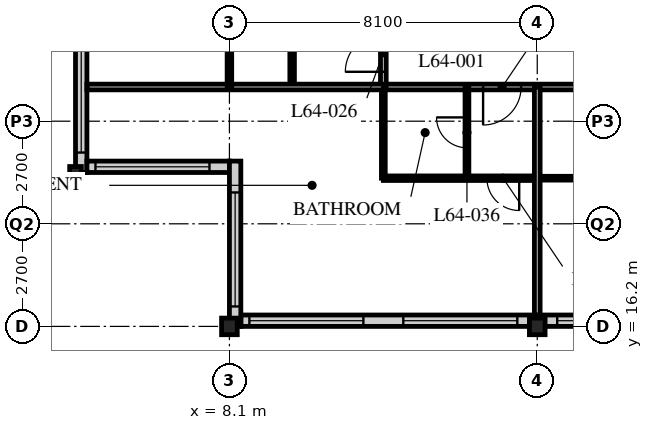
"""IFC4 building model, lengths in metres.
Left out: names, types, materials, properties, quantities, classifications, styles, units other than length and angle.
Written with IfcOpenShell. Run it as: python <this file> out.ifc"""

import sys

from ifc_helpers import new_model, si_unit, direction, frame, frame_2d, origin, origin_2d, place, context, subcontext, project, spatial, rectangle, i_section, extrude, element, fill, save


model = new_model("IFC4")
c1 = context("Model", 3, precision=1e-05, world=origin(), true_north=direction((0.0, 1.0)))
c2 = subcontext(c1, "Body", "Model", "MODEL_VIEW")
j1 = project(units=[si_unit("LENGTHUNIT", "METRE"), si_unit("PLANEANGLEUNIT", "RADIAN")], contexts=[c1])
p1 = place(None, origin())
s1 = spatial("IfcSite", under=j1, at=p1, CompositionType="ELEMENT")
p2 = place(p1, origin())
s2 = spatial("IfcBuilding", under=s1, at=p2, CompositionType="ELEMENT")
p3 = place(p2, frame((0.0, 0.0, 250.2)))
s3 = spatial("IfcBuildingStorey", under=s2, at=p3, CompositionType="ELEMENT", Elevation=250.2)
p4 = place(p3, frame((4.05, 20.25, 0.0), z_axis=(0.0, 0.0, 1.0), x_axis=(1.0, 0.0, 0.0)))
e1 = element("IfcColumn", 1, at=p4, inside=s3, PredefinedType="COLUMN", context=c2, shape_type="SweptSolid", body=[
    extrude(i_section(OverallWidth=0.307, OverallDepth=0.314, WebThickness=0.012, FlangeThickness=0.019, FilletRadius=0.015, at=origin_2d()), origin(), (0.0, 0.0, 1.0), 3.9),
])
for number, where, z_axis, x_axis in (
    (2, (8.1, 16.2, 0.0), (0.0, 0.0, 1.0), (1.0, 0.0, 0.0)),
    (3, (16.2, 16.2, 0.0), (0.0, 0.0, 1.0), (1.0, 0.0, 0.0)),
):
    element("IfcColumn", number, at=place(p3, frame(where, z_axis=z_axis, x_axis=x_axis)), inside=s3, PredefinedType="COLUMN", context=c2, shape_type="SweptSolid", body=[
        extrude(i_section(OverallWidth=0.412, OverallDepth=0.437, WebThickness=0.036, FlangeThickness=0.058, FilletRadius=0.015, at=origin_2d()), origin(), (0.0, 0.0, 1.0), 3.9),
    ])
p5 = place(p3, frame((8.4, 16.35, 0.0), z_axis=(0.0, 0.0, 1.0), x_axis=(1.0, 0.0, 0.0)))
e4 = element("IfcWall", 4, at=p5, inside=s3, PredefinedType="SOLIDWALL", context=c2, shape_type="SweptSolid", body=[
    extrude(rectangle(XDim=40.2, YDim=0.3, at=frame_2d((20.1, 0.0))), origin(), (0.0, 0.0, 1.0), 3.69),
])
p6 = place(p5, frame((0.225, 0.0, 0.6)))
e5 = element("IfcOpeningElement", 5, at=p6, cuts=e4, PredefinedType="OPENING", context=c2, shape_type="SweptSolid", body=[
    extrude(rectangle(XDim=3.0, YDim=2.4, at=frame_2d((1.5, 1.2))), frame((0.0, 0.16, 0.0), z_axis=(0.0, -1.0, 0.0), x_axis=(1.0, 0.0, 0.0)), (0.0, 0.0, 1.0), 0.32),
])
p7 = place(p5, frame((4.275, 0.0, 0.6)))
e6 = element("IfcOpeningElement", 6, at=p7, cuts=e4, PredefinedType="OPENING", context=c2, shape_type="SweptSolid", body=[
    extrude(rectangle(XDim=3.0, YDim=2.4, at=frame_2d((1.5, 1.2))), frame((0.0, 0.16, 0.0), z_axis=(0.0, -1.0, 0.0), x_axis=(1.0, 0.0, 0.0)), (0.0, 0.0, 1.0), 0.32),
])
p8 = place(p5, frame((8.325, 0.0, 0.6)))
e7 = element("IfcOpeningElement", 7, at=p8, cuts=e4, PredefinedType="OPENING", context=c2, shape_type="SweptSolid", body=[
    extrude(rectangle(XDim=3.0, YDim=2.4, at=frame_2d((1.5, 1.2))), frame((0.0, 0.16, 0.0), z_axis=(0.0, -1.0, 0.0), x_axis=(1.0, 0.0, 0.0)), (0.0, 0.0, 1.0), 0.32),
])
p9 = place(p5, frame((12.375, 0.0, 0.6)))
e8 = element("IfcOpeningElement", 8, at=p9, cuts=e4, PredefinedType="OPENING", context=c2, shape_type="SweptSolid", body=[
    extrude(rectangle(XDim=3.0, YDim=2.4, at=frame_2d((1.5, 1.2))), frame((0.0, 0.16, 0.0), z_axis=(0.0, -1.0, 0.0), x_axis=(1.0, 0.0, 0.0)), (0.0, 0.0, 1.0), 0.32),
])
p10 = place(p5, frame((16.425, 0.0, 0.6)))
e9 = element("IfcOpeningElement", 9, at=p10, cuts=e4, PredefinedType="OPENING", context=c2, shape_type="SweptSolid", body=[
    extrude(rectangle(XDim=3.0, YDim=2.4, at=frame_2d((1.5, 1.2))), frame((0.0, 0.16, 0.0), z_axis=(0.0, -1.0, 0.0), x_axis=(1.0, 0.0, 0.0)), (0.0, 0.0, 1.0), 0.32),
])
p11 = place(p5, frame((20.475, 0.0, 0.6)))
e10 = element("IfcOpeningElement", 10, at=p11, cuts=e4, PredefinedType="OPENING", context=c2, shape_type="SweptSolid", body=[
    extrude(rectangle(XDim=3.0, YDim=2.4, at=frame_2d((1.5, 1.2))), frame((0.0, 0.16, 0.0), z_axis=(0.0, -1.0, 0.0), x_axis=(1.0, 0.0, 0.0)), (0.0, 0.0, 1.0), 0.32),
])
p12 = place(p5, frame((24.525, 0.0, 0.6)))
e11 = element("IfcOpeningElement", 11, at=p12, cuts=e4, PredefinedType="OPENING", context=c2, shape_type="SweptSolid", body=[
    extrude(rectangle(XDim=3.0, YDim=2.4, at=frame_2d((1.5, 1.2))), frame((0.0, 0.16, 0.0), z_axis=(0.0, -1.0, 0.0), x_axis=(1.0, 0.0, 0.0)), (0.0, 0.0, 1.0), 0.32),
])
p13 = place(p5, frame((28.575, 0.0, 0.6)))
e12 = element("IfcOpeningElement", 12, at=p13, cuts=e4, PredefinedType="OPENING", context=c2, shape_type="SweptSolid", body=[
    extrude(rectangle(XDim=3.0, YDim=2.4, at=frame_2d((1.5, 1.2))), frame((0.0, 0.16, 0.0), z_axis=(0.0, -1.0, 0.0), x_axis=(1.0, 0.0, 0.0)), (0.0, 0.0, 1.0), 0.32),
])
p14 = place(p5, frame((32.625, 0.0, 0.6)))
e13 = element("IfcOpeningElement", 13, at=p14, cuts=e4, PredefinedType="OPENING", context=c2, shape_type="SweptSolid", body=[
    extrude(rectangle(XDim=3.0, YDim=2.4, at=frame_2d((1.5, 1.2))), frame((0.0, 0.16, 0.0), z_axis=(0.0, -1.0, 0.0), x_axis=(1.0, 0.0, 0.0)), (0.0, 0.0, 1.0), 0.32),
])
p15 = place(p5, frame((36.675, 0.0, 0.6)))
e14 = element("IfcOpeningElement", 14, at=p15, cuts=e4, PredefinedType="OPENING", context=c2, shape_type="SweptSolid", body=[
    extrude(rectangle(XDim=3.0, YDim=2.4, at=frame_2d((1.5, 1.2))), frame((0.0, 0.16, 0.0), z_axis=(0.0, -1.0, 0.0), x_axis=(1.0, 0.0, 0.0)), (0.0, 0.0, 1.0), 0.32),
])
p16 = place(p3, frame((4.2, 24.6, 0.0), z_axis=(0.0, 0.0, 1.0), x_axis=(0.0, -1.0, 0.0)))
e15 = element("IfcWall", 15, at=p16, inside=s3, PredefinedType="SOLIDWALL", context=c2, shape_type="SweptSolid", body=[
    extrude(rectangle(XDim=4.35, YDim=0.3, at=frame_2d((2.175, 0.0))), origin(), (0.0, 0.0, 1.0), 3.69),
])
p17 = place(p16, frame((0.825, 0.0, 0.6)))
e16 = element("IfcOpeningElement", 16, at=p17, cuts=e15, PredefinedType="OPENING", context=c2, shape_type="SweptSolid", body=[
    extrude(rectangle(XDim=3.0, YDim=2.3, at=frame_2d((1.5, 1.15))), frame((0.0, 0.16, 0.0), z_axis=(0.0, -1.0, 0.0), x_axis=(1.0, 0.0, 0.0)), (0.0, 0.0, 1.0), 0.32),
])
p18 = place(p3, frame((4.35, 20.4, 0.0), z_axis=(0.0, 0.0, 1.0), x_axis=(1.0, 0.0, 0.0)))
e17 = element("IfcWall", 17, at=p18, inside=s3, PredefinedType="SOLIDWALL", context=c2, shape_type="SweptSolid", body=[
    extrude(rectangle(XDim=3.75, YDim=0.3, at=frame_2d((1.875, 0.0))), origin(), (0.0, 0.0, 1.0), 3.69),
])
p19 = place(p18, frame((0.225, 0.0, 0.6)))
e18 = element("IfcOpeningElement", 18, at=p19, cuts=e17, PredefinedType="OPENING", context=c2, shape_type="SweptSolid", body=[
    extrude(rectangle(XDim=3.0, YDim=2.3, at=frame_2d((1.5, 1.15))), frame((0.0, 0.16, 0.0), z_axis=(0.0, -1.0, 0.0), x_axis=(1.0, 0.0, 0.0)), (0.0, 0.0, 1.0), 0.32),
])
p20 = place(p3, frame((8.25, 20.55, 0.0), z_axis=(0.0, 0.0, 1.0), x_axis=(0.0, -1.0, 0.0)))
e19 = element("IfcWall", 19, at=p20, inside=s3, PredefinedType="SOLIDWALL", context=c2, shape_type="SweptSolid", body=[
    extrude(rectangle(XDim=4.35, YDim=0.3, at=frame_2d((2.175, 0.0))), origin(), (0.0, 0.0, 1.0), 3.69),
])
p21 = place(p20, frame((0.825, 0.0, 0.6)))
e20 = element("IfcOpeningElement", 20, at=p21, cuts=e19, PredefinedType="OPENING", context=c2, shape_type="SweptSolid", body=[
    extrude(rectangle(XDim=3.0, YDim=2.3, at=frame_2d((1.5, 1.15))), frame((0.0, 0.16, 0.0), z_axis=(0.0, -1.0, 0.0), x_axis=(1.0, 0.0, 0.0)), (0.0, 0.0, 1.0), 0.32),
])
p22 = place(p3, frame((12.15, 22.5, 0.0), z_axis=(0.0, 0.0, 1.0), x_axis=(1.0, 0.0, 0.0)))
e21 = element("IfcWall", 21, at=p22, inside=s3, PredefinedType="PARTITIONING", context=c2, shape_type="SweptSolid", body=[
    extrude(rectangle(XDim=24.3, YDim=0.15, at=frame_2d((12.15, 0.0))), origin(), (0.0, 0.0, 1.0), 3.69),
])
p23 = place(p22, frame((6.4, 0.0, 0.0)))
e22 = element("IfcOpeningElement", 22, at=p23, cuts=e21, PredefinedType="OPENING", context=c2, shape_type="SweptSolid", body=[
    extrude(rectangle(XDim=1.0, YDim=2.1, at=frame_2d((0.5, 1.05))), frame((0.0, 0.085, 0.0), z_axis=(0.0, -1.0, 0.0), x_axis=(1.0, 0.0, 0.0)), (0.0, 0.0, 1.0), 0.17),
])
p24 = place(p22, frame((8.5, 0.0, 0.0)))
e23 = element("IfcOpeningElement", 23, at=p24, cuts=e21, PredefinedType="OPENING", context=c2, shape_type="SweptSolid", body=[
    extrude(rectangle(XDim=1.0, YDim=2.1, at=frame_2d((0.5, 1.05))), frame((0.0, 0.085, 0.0), z_axis=(0.0, -1.0, 0.0), x_axis=(1.0, 0.0, 0.0)), (0.0, 0.0, 1.0), 0.17),
])
p25 = place(p22, frame((16.6, 0.0, 0.0)))
e24 = element("IfcOpeningElement", 24, at=p25, cuts=e21, PredefinedType="OPENING", context=c2, shape_type="SweptSolid", body=[
    extrude(rectangle(XDim=1.0, YDim=2.1, at=frame_2d((0.5, 1.05))), frame((0.0, 0.085, 0.0), z_axis=(0.0, -1.0, 0.0), x_axis=(1.0, 0.0, 0.0)), (0.0, 0.0, 1.0), 0.17),
])
p26 = place(p22, frame((2.625, 0.0, 0.0)))
e25 = element("IfcOpeningElement", 25, at=p26, cuts=e21, PredefinedType="OPENING", context=c2, shape_type="SweptSolid", body=[
    extrude(rectangle(XDim=1.0, YDim=2.1, at=frame_2d((0.5, 1.05))), frame((0.0, 0.085, 0.0), z_axis=(0.0, -1.0, 0.0), x_axis=(1.0, 0.0, 0.0)), (0.0, 0.0, 1.0), 0.17),
])
p27 = place(p3, frame((12.15, 22.5, 0.0), z_axis=(0.0, 0.0, 1.0), x_axis=(0.0, 1.0, 0.0)))
e26 = element("IfcWall", 26, at=p27, inside=s3, PredefinedType="PARTITIONING", context=c2, shape_type="SweptSolid", body=[
    extrude(rectangle(XDim=30.15, YDim=0.15, at=frame_2d((15.075, 0.0))), origin(), (0.0, 0.0, 1.0), 3.69),
])
p28 = place(p27, frame((0.4, 0.0, 0.0)))
e27 = element("IfcOpeningElement", 27, at=p28, cuts=e26, PredefinedType="OPENING", context=c2, shape_type="SweptSolid", body=[
    extrude(rectangle(XDim=1.0, YDim=2.1, at=frame_2d((0.5, 1.05))), frame((0.0, 0.085, 0.0), z_axis=(0.0, -1.0, 0.0), x_axis=(1.0, 0.0, 0.0)), (0.0, 0.0, 1.0), 0.17),
])
p29 = place(p27, frame((24.4, 0.0, 0.0)))
e28 = element("IfcOpeningElement", 28, at=p29, cuts=e26, PredefinedType="OPENING", context=c2, shape_type="SweptSolid", body=[
    extrude(rectangle(XDim=1.0, YDim=2.1, at=frame_2d((0.5, 1.05))), frame((0.0, 0.085, 0.0), z_axis=(0.0, -1.0, 0.0), x_axis=(1.0, 0.0, 0.0)), (0.0, 0.0, 1.0), 0.17),
])
p30 = place(p27, frame((28.45, 0.0, 0.0)))
e29 = element("IfcOpeningElement", 29, at=p30, cuts=e26, PredefinedType="OPENING", context=c2, shape_type="SweptSolid", body=[
    extrude(rectangle(XDim=1.0, YDim=2.1, at=frame_2d((0.5, 1.05))), frame((0.0, 0.085, 0.0), z_axis=(0.0, -1.0, 0.0), x_axis=(1.0, 0.0, 0.0)), (0.0, 0.0, 1.0), 0.17),
])
p31 = place(p3, frame((16.2, 20.1, 0.0), z_axis=(0.0, 0.0, 1.0), x_axis=(1.0, 0.0, 0.0)))
e30 = element("IfcWall", 30, at=p31, inside=s3, PredefinedType="PARTITIONING", context=c2, shape_type="SweptSolid", body=[
    extrude(rectangle(XDim=2.2, YDim=0.1, at=frame_2d((1.1, 0.0))), origin(), (0.0, 0.0, 1.0), 3.69),
])
p32 = place(p3, frame((9.75, 22.5, 0.0), z_axis=(0.0, 0.0, 1.0), x_axis=(0.0, 1.0, 0.0)))
e31 = element("IfcWall", 31, at=p32, inside=s3, PredefinedType="PARTITIONING", context=c2, shape_type="SweptSolid", body=[
    extrude(rectangle(XDim=22.05, YDim=0.12, at=frame_2d((11.025, 0.0))), origin(), (0.0, 0.0, 1.0), 3.69),
])
p33 = place(p32, frame((0.975, 0.0, 0.0)))
e32 = element("IfcOpeningElement", 32, at=p33, cuts=e31, PredefinedType="OPENING", context=c2, shape_type="SweptSolid", body=[
    extrude(rectangle(XDim=0.85, YDim=2.1, at=frame_2d((0.425, 1.05))), frame((0.0, 0.07, 0.0), z_axis=(0.0, -1.0, 0.0), x_axis=(1.0, 0.0, 0.0)), (0.0, 0.0, 1.0), 0.14),
])
p34 = place(p32, frame((10.225, 0.0, 0.0)))
e33 = element("IfcOpeningElement", 33, at=p34, cuts=e31, PredefinedType="OPENING", context=c2, shape_type="SweptSolid", body=[
    extrude(rectangle(XDim=0.85, YDim=2.1, at=frame_2d((0.425, 1.05))), frame((0.0, 0.07, 0.0), z_axis=(0.0, -1.0, 0.0), x_axis=(1.0, 0.0, 0.0)), (0.0, 0.0, 1.0), 0.14),
])
p35 = place(p32, frame((14.275, 0.0, 0.0)))
e34 = element("IfcOpeningElement", 34, at=p35, cuts=e31, PredefinedType="OPENING", context=c2, shape_type="SweptSolid", body=[
    extrude(rectangle(XDim=0.85, YDim=2.1, at=frame_2d((0.425, 1.05))), frame((0.0, 0.07, 0.0), z_axis=(0.0, -1.0, 0.0), x_axis=(1.0, 0.0, 0.0)), (0.0, 0.0, 1.0), 0.14),
])
p36 = place(p32, frame((18.325, 0.0, 0.0)))
e35 = element("IfcOpeningElement", 35, at=p36, cuts=e31, PredefinedType="OPENING", context=c2, shape_type="SweptSolid", body=[
    extrude(rectangle(XDim=0.85, YDim=2.1, at=frame_2d((0.425, 1.05))), frame((0.0, 0.07, 0.0), z_axis=(0.0, -1.0, 0.0), x_axis=(1.0, 0.0, 0.0)), (0.0, 0.0, 1.0), 0.14),
])
p37 = place(p3, frame((12.15, 20.1, 0.0), z_axis=(0.0, 0.0, 1.0), x_axis=(1.0, 0.0, 0.0)))
e36 = element("IfcWall", 36, at=p37, inside=s3, PredefinedType="PARTITIONING", context=c2, shape_type="SweptSolid", body=[
    extrude(rectangle(XDim=4.05, YDim=0.12, at=frame_2d((2.025, 0.0))), origin(), (0.0, 0.0, 1.0), 3.69),
])
p38 = place(p37, frame((2.725, 0.0, 0.0)))
e37 = element("IfcOpeningElement", 37, at=p38, cuts=e36, PredefinedType="OPENING", context=c2, shape_type="SweptSolid", body=[
    extrude(rectangle(XDim=0.85, YDim=2.1, at=frame_2d((0.425, 1.05))), frame((0.0, 0.07, 0.0), z_axis=(0.0, -1.0, 0.0), x_axis=(1.0, 0.0, 0.0)), (0.0, 0.0, 1.0), 0.14),
])
p39 = place(p3, frame((14.35, 22.5, 0.0), z_axis=(0.0, 0.0, 1.0), x_axis=(0.0, -1.0, 0.0)))
e38 = element("IfcWall", 38, at=p39, inside=s3, PredefinedType="PARTITIONING", context=c2, shape_type="SweptSolid", body=[
    extrude(rectangle(XDim=2.4, YDim=0.1, at=frame_2d((1.2, 0.0))), origin(), (0.0, 0.0, 1.0), 3.69),
])
p40 = place(p39, frame((0.8, 0.0, 0.0)))
e39 = element("IfcOpeningElement", 39, at=p40, cuts=e38, PredefinedType="OPENING", context=c2, shape_type="SweptSolid", body=[
    extrude(rectangle(XDim=0.8, YDim=2.1, at=frame_2d((0.4, 1.05))), frame((0.0, 0.06, 0.0), z_axis=(0.0, -1.0, 0.0), x_axis=(1.0, 0.0, 0.0)), (0.0, 0.0, 1.0), 0.12),
])
p41 = place(p3, frame((12.15, 22.5, 0.0), z_axis=(0.0, 0.0, 1.0), x_axis=(0.0, -1.0, 0.0)))
e40 = element("IfcWall", 40, at=p41, inside=s3, PredefinedType="PARTITIONING", context=c2, shape_type="SweptSolid", body=[
    extrude(rectangle(XDim=2.4, YDim=0.1, at=frame_2d((1.2, 0.0))), origin(), (0.0, 0.0, 1.0), 3.69),
])
p42 = place(p3, frame((4.35, 22.5, 0.0), z_axis=(0.0, 0.0, 1.0), x_axis=(1.0, 0.0, 0.0)))
e41 = element("IfcWall", 41, at=p42, inside=s3, PredefinedType="PARTITIONING", context=c2, shape_type="SweptSolid", body=[
    extrude(rectangle(XDim=7.8, YDim=0.15, at=frame_2d((3.9, 0.0))), origin(), (0.0, 0.0, 1.0), 3.69),
])
p43 = place(p3, frame((16.2, 22.5, 0.0), z_axis=(0.0, 0.0, 1.0), x_axis=(0.0, -1.0, 0.0)))
e42 = element("IfcWall", 42, at=p43, inside=s3, PredefinedType="PARTITIONING", context=c2, shape_type="SweptSolid", body=[
    extrude(rectangle(XDim=6.0, YDim=0.15, at=frame_2d((3.0, 0.0))), origin(), (0.0, 0.0, 1.0), 3.078),
])
p44 = place(p3, frame((8.1, 22.5, 0.0), z_axis=(0.0, 0.0, 1.0), x_axis=(0.0, 1.0, 0.0)))
e43 = element("IfcWall", 43, at=p44, inside=s3, PredefinedType="PARTITIONING", context=c2, shape_type="SweptSolid", body=[
    extrude(rectangle(XDim=1.597, YDim=0.12, at=frame_2d((0.798, 0.0))), origin(), (0.0, 0.0, 1.0), 3.078),
])
p45 = place(p6, origin())
e44 = element("IfcWindow", 44, at=p45, inside=s3, PartitioningType="SINGLE_PANEL", PredefinedType="WINDOW", context=c2, shape_type="SweptSolid", body=[
    extrude(rectangle(XDim=3.0, YDim=2.4, at=frame_2d((1.5, 1.2))), frame((0.0, 0.03, 0.0), z_axis=(0.0, -1.0, 0.0), x_axis=(1.0, 0.0, 0.0)), (0.0, 0.0, 1.0), 0.06),
])
fill(e5, e44)
p46 = place(p7, origin())
e45 = element("IfcWindow", 45, at=p46, inside=s3, PartitioningType="SINGLE_PANEL", PredefinedType="WINDOW", context=c2, shape_type="SweptSolid", body=[
    extrude(rectangle(XDim=3.0, YDim=2.4, at=frame_2d((1.5, 1.2))), frame((0.0, 0.03, 0.0), z_axis=(0.0, -1.0, 0.0), x_axis=(1.0, 0.0, 0.0)), (0.0, 0.0, 1.0), 0.06),
])
fill(e6, e45)
p47 = place(p8, origin())
e46 = element("IfcWindow", 46, at=p47, inside=s3, PartitioningType="SINGLE_PANEL", PredefinedType="WINDOW", context=c2, shape_type="SweptSolid", body=[
    extrude(rectangle(XDim=3.0, YDim=2.4, at=frame_2d((1.5, 1.2))), frame((0.0, 0.03, 0.0), z_axis=(0.0, -1.0, 0.0), x_axis=(1.0, 0.0, 0.0)), (0.0, 0.0, 1.0), 0.06),
])
fill(e7, e46)
p48 = place(p17, origin())
e47 = element("IfcWindow", 47, at=p48, inside=s3, PartitioningType="SINGLE_PANEL", PredefinedType="WINDOW", context=c2, shape_type="SweptSolid", body=[
    extrude(rectangle(XDim=3.0, YDim=2.3, at=frame_2d((1.5, 1.15))), frame((0.0, 0.03, 0.0), z_axis=(0.0, -1.0, 0.0), x_axis=(1.0, 0.0, 0.0)), (0.0, 0.0, 1.0), 0.06),
])
fill(e16, e47)
p49 = place(p19, origin())
e48 = element("IfcWindow", 48, at=p49, inside=s3, PartitioningType="SINGLE_PANEL", PredefinedType="WINDOW", context=c2, shape_type="SweptSolid", body=[
    extrude(rectangle(XDim=3.0, YDim=2.3, at=frame_2d((1.5, 1.15))), frame((0.0, 0.03, 0.0), z_axis=(0.0, -1.0, 0.0), x_axis=(1.0, 0.0, 0.0)), (0.0, 0.0, 1.0), 0.06),
])
fill(e18, e48)
p50 = place(p21, origin())
e49 = element("IfcWindow", 49, at=p50, inside=s3, PartitioningType="SINGLE_PANEL", PredefinedType="WINDOW", context=c2, shape_type="SweptSolid", body=[
    extrude(rectangle(XDim=3.0, YDim=2.3, at=frame_2d((1.5, 1.15))), frame((0.0, 0.03, 0.0), z_axis=(0.0, -1.0, 0.0), x_axis=(1.0, 0.0, 0.0)), (0.0, 0.0, 1.0), 0.06),
])
fill(e20, e49)
p51 = place(p28, origin())
e50 = element("IfcDoor", 50, at=p51, inside=s3, OperationType="SINGLE_SWING_LEFT", PredefinedType="DOOR", context=c2, shape_type="SweptSolid", body=[
    extrude(rectangle(XDim=1.0, YDim=2.1, at=frame_2d((0.5, 1.05))), frame((0.0, 0.025, 0.0), z_axis=(0.0, -1.0, 0.0), x_axis=(1.0, 0.0, 0.0)), (0.0, 0.0, 1.0), 0.05),
])
fill(e27, e50)
p52 = place(p40, origin())
e51 = element("IfcDoor", 51, at=p52, inside=s3, OperationType="SINGLE_SWING_RIGHT", PredefinedType="DOOR", context=c2, shape_type="SweptSolid", body=[
    extrude(rectangle(XDim=0.8, YDim=2.1, at=frame_2d((0.4, 1.05))), frame((0.0, 0.025, 0.0), z_axis=(0.0, -1.0, 0.0), x_axis=(1.0, 0.0, 0.0)), (0.0, 0.0, 1.0), 0.05),
])
fill(e39, e51)
p53 = place(p26, origin())
e52 = element("IfcDoor", 52, at=p53, inside=s3, OperationType="SINGLE_SWING_RIGHT", PredefinedType="DOOR", context=c2, shape_type="SweptSolid", body=[
    extrude(rectangle(XDim=1.0, YDim=2.1, at=frame_2d((0.5, 1.05))), frame((0.0, 0.025, 0.0), z_axis=(0.0, -1.0, 0.0), x_axis=(1.0, 0.0, 0.0)), (0.0, 0.0, 1.0), 0.05),
])
fill(e25, e52)
p54 = place(p38, origin())
e53 = element("IfcDoor", 53, at=p54, inside=s3, OperationType="SINGLE_SWING_LEFT", PredefinedType="DOOR", context=c2, shape_type="SweptSolid", body=[
    extrude(rectangle(XDim=0.85, YDim=2.1, at=frame_2d((0.425, 1.05))), frame((0.0, 0.025, 0.0), z_axis=(0.0, -1.0, 0.0), x_axis=(1.0, 0.0, 0.0)), (0.0, 0.0, 1.0), 0.05),
])
fill(e37, e53)
save(model, sys.argv[1])
